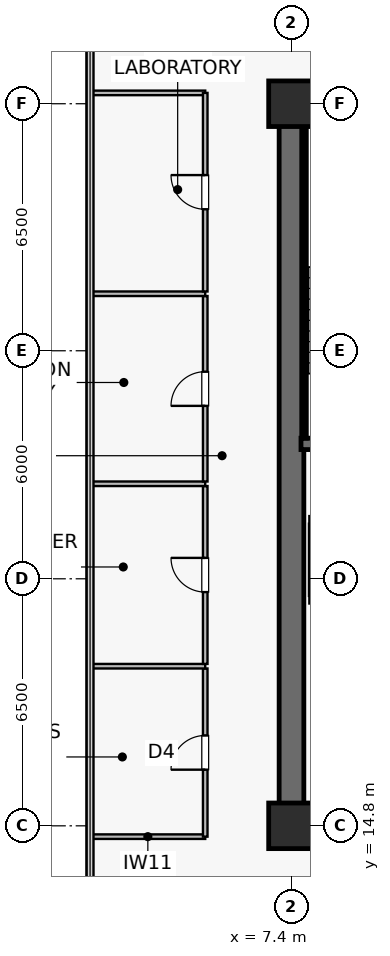
"""IFC4 building model, lengths in metres.
Left out: names, types, materials, properties, quantities, classifications, styles, units other than length and angle.
Written with IfcOpenShell. Run it as: python <this file> out.ifc"""

import sys

from ifc_helpers import new_model, si_unit, direction, frame, frame_2d, origin, origin_2d, place, context, subcontext, project, spatial, rectangle, extrude, source, transform, mapped, element, fill, save


model = new_model("IFC4")
c1 = context("Model", 3, precision=1e-05, world=origin(), true_north=direction((0.0, 1.0)))
c2 = subcontext(c1, "Body", "Model", "MODEL_VIEW")
j1 = project(units=[si_unit("LENGTHUNIT", "METRE"), si_unit("PLANEANGLEUNIT", "RADIAN")], contexts=[c1])
p1 = place(None, origin())
s1 = spatial("IfcSite", under=j1, at=p1, CompositionType="ELEMENT")
p2 = place(p1, origin())
s2 = spatial("IfcBuilding", under=s1, at=p2, CompositionType="ELEMENT")
p3 = place(p2, frame((0.0, 0.0, 154.3)))
s3 = spatial("IfcBuildingStorey", under=s2, at=p3, CompositionType="ELEMENT", Elevation=154.3)
p4 = place(p3, frame((7.075, 14.8, 0.0), z_axis=(0.0, 0.0, 1.0), x_axis=(1.0, 0.0, 0.0)))
e1 = element("IfcWall", 1, at=p4, inside=s3, PredefinedType="SHEAR", context=c2, shape_type="SweptSolid", body=[
    extrude(rectangle(XDim=15.45, YDim=0.65, at=frame_2d((7.725, 0.0))), origin(), (0.0, 0.0, 1.0), 3.79),
])
p5 = place(p3, frame((7.075, 33.8, 0.0), z_axis=(0.0, 0.0, 1.0), x_axis=(1.0, 0.0, 0.0)))
e2 = element("IfcWall", 2, at=p5, inside=s3, PredefinedType="SHEAR", context=c2, shape_type="SweptSolid", body=[
    extrude(rectangle(XDim=15.45, YDim=0.65, at=frame_2d((7.725, 0.0))), origin(), (0.0, 0.0, 1.0), 3.79),
])
p6 = place(p5, frame((5.25, 0.0, 0.0)))
e3 = element("IfcOpeningElement", 3, at=p6, cuts=e2, PredefinedType="OPENING", context=c2, shape_type="SweptSolid", body=[
    extrude(rectangle(XDim=0.95, YDim=2.15, at=frame_2d((0.475, 1.075))), frame((0.0, 0.335, 0.0), z_axis=(0.0, -1.0, 0.0), x_axis=(1.0, 0.0, 0.0)), (0.0, 0.0, 1.0), 0.67),
])
p7 = place(p5, frame((7.765, 0.0, 0.0)))
e4 = element("IfcOpeningElement", 4, at=p7, cuts=e2, PredefinedType="OPENING", context=c2, shape_type="SweptSolid", body=[
    extrude(rectangle(XDim=0.95, YDim=2.15, at=frame_2d((0.475, 1.075))), frame((0.0, 0.335, 0.0), z_axis=(0.0, -1.0, 0.0), x_axis=(1.0, 0.0, 0.0)), (0.0, 0.0, 1.0), 0.67),
])
p8 = place(p5, frame((10.315, 0.0, 0.0)))
e5 = element("IfcOpeningElement", 5, at=p8, cuts=e2, PredefinedType="OPENING", context=c2, shape_type="SweptSolid", body=[
    extrude(rectangle(XDim=0.95, YDim=2.15, at=frame_2d((0.475, 1.075))), frame((0.0, 0.335, 0.0), z_axis=(0.0, -1.0, 0.0), x_axis=(1.0, 0.0, 0.0)), (0.0, 0.0, 1.0), 0.67),
])
p9 = place(p5, frame((12.865, 0.0, 0.0)))
e6 = element("IfcOpeningElement", 6, at=p9, cuts=e2, PredefinedType="OPENING", context=c2, shape_type="SweptSolid", body=[
    extrude(rectangle(XDim=0.95, YDim=2.15, at=frame_2d((0.475, 1.075))), frame((0.0, 0.335, 0.0), z_axis=(0.0, -1.0, 0.0), x_axis=(1.0, 0.0, 0.0)), (0.0, 0.0, 1.0), 0.67),
])
p10 = place(p3, frame((7.4, 15.125, 0.0), z_axis=(0.0, 0.0, 1.0), x_axis=(0.0, 1.0, 0.0)))
e7 = element("IfcWall", 7, at=p10, inside=s3, PredefinedType="SHEAR", context=c2, shape_type="SweptSolid", body=[
    extrude(rectangle(XDim=18.35, YDim=0.65, at=frame_2d((9.175, 0.0))), origin(), (0.0, 0.0, 1.0), 3.79),
])
p11 = place(p3, frame((7.65, 24.85, 0.0), z_axis=(0.0, 0.0, 1.0), x_axis=(1.0, 0.0, 0.0)))
e8 = element("IfcWall", 8, at=p11, inside=s3, PredefinedType="SHEAR", context=c2, shape_type="SweptSolid", body=[
    extrude(rectangle(XDim=3.8, YDim=0.3, at=frame_2d((1.9, 0.0))), origin(), (0.0, 0.0, 1.0), 3.79),
])
p12 = place(p3, frame((7.73, 33.4, 0.0), z_axis=(0.0, 0.0, 1.0), x_axis=(1.0, 0.0, 0.0)))
e9 = element("IfcWall", 9, at=p12, inside=s3, PredefinedType="SOLIDWALL", context=c2, shape_type="SweptSolid", body=[
    extrude(rectangle(XDim=3.72, YDim=0.12, at=frame_2d((1.86, 0.0))), origin(), (0.0, 0.0, 1.0), 3.79),
])
p13 = place(p3, frame((7.73, 25.0, 0.0), z_axis=(0.0, 0.0, 1.0), x_axis=(0.0, 1.0, 0.0)))
e10 = element("IfcWall", 10, at=p13, inside=s3, PredefinedType="SOLIDWALL", context=c2, shape_type="SweptSolid", body=[
    extrude(rectangle(XDim=8.32, YDim=0.12, at=frame_2d((4.16, 0.0))), origin(), (0.0, 0.0, 1.0), 3.79),
])
m1 = source(origin(), c2, "Body", "SweptSolid", [
    extrude(rectangle(XDim=1.2, YDim=1.2, at=origin_2d()), origin(), (0.0, 0.0, 1.0), 4.1),
])
for number, where, z_axis, x_axis in (
    (11, (7.4, 14.8, 0.0), (0.0, 0.0, 1.0), (1.0, 0.0, 0.0)),
    (12, (7.4, 33.8, 0.0), (0.0, 0.0, 1.0), (1.0, 0.0, 0.0)),
):
    element("IfcColumn", number, at=place(p3, frame(where, z_axis=z_axis, x_axis=x_axis)), inside=s3, PredefinedType="COLUMN", context=c2, shape_type="MappedRepresentation", body=[
        mapped(m1, transform((0.0, 0.0, 0.0), scale=1.0)),
    ])
for number, where, z_axis, x_axis in (
    (13, (7.87, 20.75, 0.0), (0.0, 0.0, 1.0), (1.0, 0.0, 0.0)),
    (14, (7.87, 22.85, 0.0), (0.0, 0.0, 1.0), (1.0, 0.0, 0.0)),
):
    element("IfcWall", number, at=place(p3, frame(where, z_axis=z_axis, x_axis=x_axis)), inside=s3, PredefinedType="SOLIDWALL", context=c2, shape_type="SweptSolid", body=[
        extrude(rectangle(XDim=2.26, YDim=0.2, at=frame_2d((1.13, 0.0))), origin(), (0.0, 0.0, 1.0), 3.79),
    ])
p14 = place(p3, frame((7.95, 20.85, 0.0), z_axis=(0.0, 0.0, 1.0), x_axis=(0.0, 1.0, 0.0)))
e15 = element("IfcWall", 15, at=p14, inside=s3, PredefinedType="SOLIDWALL", context=c2, shape_type="SweptSolid", body=[
    extrude(rectangle(XDim=1.9, YDim=0.18, at=frame_2d((0.95, 0.0))), origin(), (0.0, 0.0, 1.0), 3.79),
])
for number, where, z_axis, x_axis in (
    (16, (2.11, 14.515, 0.0), (0.0, 0.0, 1.0), (1.0, 0.0, 0.0)),
    (17, (2.11, 34.085, 0.0), (0.0, 0.0, 1.0), (1.0, 0.0, 0.0)),
):
    element("IfcWall", number, at=place(p3, frame(where, z_axis=z_axis, x_axis=x_axis)), inside=s3, PredefinedType="PARTITIONING", context=c2, shape_type="SweptSolid", body=[
        extrude(rectangle(XDim=3.02, YDim=0.12, at=frame_2d((1.51, 0.0))), origin(), (0.0, 0.0, 1.0), 3.79),
    ])
p15 = place(p3, frame((5.13, 14.515, 0.0), z_axis=(0.0, 0.0, 1.0), x_axis=(0.0, 1.0, 0.0)))
e18 = element("IfcWall", 18, at=p15, inside=s3, PredefinedType="PARTITIONING", context=c2, shape_type="SweptSolid", body=[
    extrude(rectangle(XDim=4.425, YDim=0.12, at=frame_2d((2.212, 0.0))), origin(), (0.0, 0.0, 1.0), 3.79),
])
p16 = place(p15, frame((1.762, 0.0, 0.0)))
e19 = element("IfcOpeningElement", 19, at=p16, cuts=e18, PredefinedType="OPENING", context=c2, shape_type="SweptSolid", body=[
    extrude(rectangle(XDim=0.9, YDim=2.1, at=frame_2d((0.45, 1.05))), frame((0.0, 0.07, 0.0), z_axis=(0.0, -1.0, 0.0), x_axis=(1.0, 0.0, 0.0)), (0.0, 0.0, 1.0), 0.14),
])
p17 = place(p3, frame((2.11, 19.0, 0.0), z_axis=(0.0, 0.0, 1.0), x_axis=(1.0, 0.0, 0.0)))
e20 = element("IfcWall", 20, at=p17, inside=s3, PredefinedType="PARTITIONING", context=c2, shape_type="SweptSolid", body=[
    extrude(rectangle(XDim=3.02, YDim=0.12, at=frame_2d((1.51, 0.0))), origin(), (0.0, 0.0, 1.0), 3.79),
])
p18 = place(p3, frame((5.13, 19.06, 0.0), z_axis=(0.0, 0.0, 1.0), x_axis=(0.0, 1.0, 0.0)))
e21 = element("IfcWall", 21, at=p18, inside=s3, PredefinedType="PARTITIONING", context=c2, shape_type="SweptSolid", body=[
    extrude(rectangle(XDim=4.68, YDim=0.12, at=frame_2d((2.34, 0.0))), origin(), (0.0, 0.0, 1.0), 3.79),
])
p19 = place(p18, frame((1.89, 0.0, 0.0)))
e22 = element("IfcOpeningElement", 22, at=p19, cuts=e21, PredefinedType="OPENING", context=c2, shape_type="SweptSolid", body=[
    extrude(rectangle(XDim=0.9, YDim=2.1, at=frame_2d((0.45, 1.05))), frame((0.0, 0.07, 0.0), z_axis=(0.0, -1.0, 0.0), x_axis=(1.0, 0.0, 0.0)), (0.0, 0.0, 1.0), 0.14),
])
p20 = place(p3, frame((2.11, 23.8, 0.0), z_axis=(0.0, 0.0, 1.0), x_axis=(1.0, 0.0, 0.0)))
e23 = element("IfcWall", 23, at=p20, inside=s3, PredefinedType="PARTITIONING", context=c2, shape_type="SweptSolid", body=[
    extrude(rectangle(XDim=3.02, YDim=0.12, at=frame_2d((1.51, 0.0))), origin(), (0.0, 0.0, 1.0), 3.79),
])
p21 = place(p3, frame((5.13, 23.86, 0.0), z_axis=(0.0, 0.0, 1.0), x_axis=(0.0, 1.0, 0.0)))
e24 = element("IfcWall", 24, at=p21, inside=s3, PredefinedType="PARTITIONING", context=c2, shape_type="SweptSolid", body=[
    extrude(rectangle(XDim=4.88, YDim=0.12, at=frame_2d((2.44, 0.0))), origin(), (0.0, 0.0, 1.0), 3.79),
])
p22 = place(p21, frame((1.99, 0.0, 0.0)))
e25 = element("IfcOpeningElement", 25, at=p22, cuts=e24, PredefinedType="OPENING", context=c2, shape_type="SweptSolid", body=[
    extrude(rectangle(XDim=0.9, YDim=2.1, at=frame_2d((0.45, 1.05))), frame((0.0, 0.07, 0.0), z_axis=(0.0, -1.0, 0.0), x_axis=(1.0, 0.0, 0.0)), (0.0, 0.0, 1.0), 0.14),
])
p23 = place(p3, frame((2.11, 28.8, 0.0), z_axis=(0.0, 0.0, 1.0), x_axis=(1.0, 0.0, 0.0)))
e26 = element("IfcWall", 26, at=p23, inside=s3, PredefinedType="PARTITIONING", context=c2, shape_type="SweptSolid", body=[
    extrude(rectangle(XDim=3.02, YDim=0.12, at=frame_2d((1.51, 0.0))), origin(), (0.0, 0.0, 1.0), 3.79),
])
p24 = place(p3, frame((5.13, 28.86, 0.0), z_axis=(0.0, 0.0, 1.0), x_axis=(0.0, 1.0, 0.0)))
e27 = element("IfcWall", 27, at=p24, inside=s3, PredefinedType="PARTITIONING", context=c2, shape_type="SweptSolid", body=[
    extrude(rectangle(XDim=5.225, YDim=0.12, at=frame_2d((2.612, 0.0))), origin(), (0.0, 0.0, 1.0), 3.79),
])
p25 = place(p24, frame((2.163, 0.0, 0.0)))
e28 = element("IfcOpeningElement", 28, at=p25, cuts=e27, PredefinedType="OPENING", context=c2, shape_type="SweptSolid", body=[
    extrude(rectangle(XDim=0.9, YDim=2.1, at=frame_2d((0.45, 1.05))), frame((0.0, 0.07, 0.0), z_axis=(0.0, -1.0, 0.0), x_axis=(1.0, 0.0, 0.0)), (0.0, 0.0, 1.0), 0.14),
])
m2 = source(origin(), c2, "Body", "SweptSolid", [
    extrude(rectangle(XDim=0.9, YDim=2.1, at=frame_2d((0.45, 1.05))), frame((0.0, 0.025, 0.0), z_axis=(0.0, -1.0, 0.0), x_axis=(1.0, 0.0, 0.0)), (0.0, 0.0, 1.0), 0.05),
])
p26 = place(p16, origin())
e29 = element("IfcDoor", 29, at=p26, inside=s3, OperationType="SINGLE_SWING_LEFT", PredefinedType="DOOR", context=c2, shape_type="MappedRepresentation", body=[
    mapped(m2, transform((0.0, 0.0, 0.0), scale=1.0)),
])
fill(e19, e29)
p27 = place(p19, origin())
e30 = element("IfcDoor", 30, at=p27, inside=s3, OperationType="SINGLE_SWING_RIGHT", PredefinedType="DOOR", context=c2, shape_type="MappedRepresentation", body=[
    mapped(m2, transform((0.0, 0.0, 0.0), scale=1.0)),
])
fill(e22, e30)
p28 = place(p22, origin())
e31 = element("IfcDoor", 31, at=p28, inside=s3, OperationType="SINGLE_SWING_LEFT", PredefinedType="DOOR", context=c2, shape_type="MappedRepresentation", body=[
    mapped(m2, transform((0.0, 0.0, 0.0), scale=1.0)),
])
fill(e25, e31)
p29 = place(p25, origin())
e32 = element("IfcDoor", 32, at=p29, inside=s3, OperationType="SINGLE_SWING_RIGHT", PredefinedType="DOOR", context=c2, shape_type="MappedRepresentation", body=[
    mapped(m2, transform((0.0, 0.0, 0.0), scale=1.0)),
])
fill(e28, e32)
save(model, sys.argv[1])
